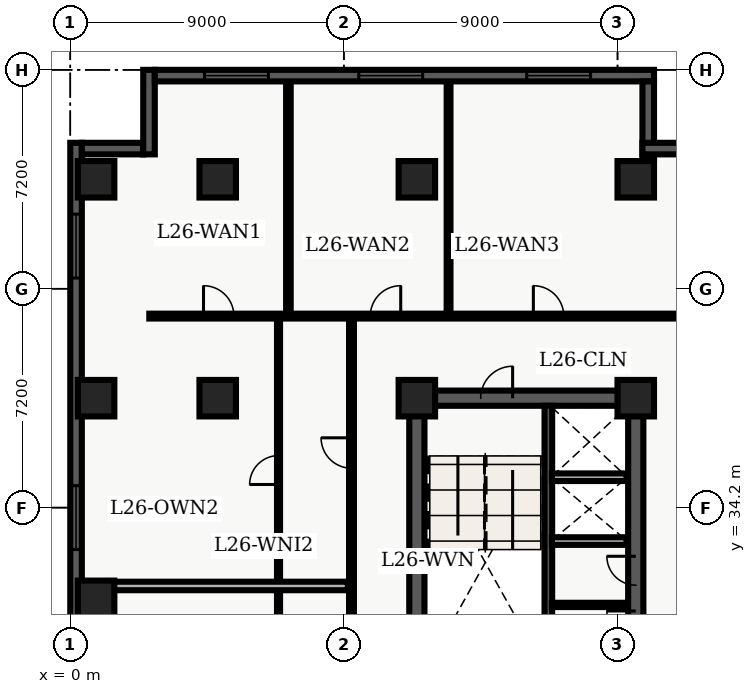
"""IFC4 building model, lengths in metres.
Left out: names, types, materials, properties, quantities, classifications, styles, units other than length and angle.
Written with IfcOpenShell. Run it as: python <this file> out.ifc"""

import sys

from ifc_helpers import new_model, entity, si_unit, converted_unit, direction, frame, origin_with_axes, origin_2d_with_axis, place, context, subcontext, project, spatial, polyline, rectangle, outline, extrude, element, fill, save


model = new_model("IFC4")
c1 = context("Model", 3, precision=1e-05, world=origin_with_axes(), true_north=direction((0.0, 1.0)))
c2 = subcontext(c1, "Body", "Model", "MODEL_VIEW")
j1 = project(units=[si_unit("LENGTHUNIT", "METRE"), converted_unit("PLANEANGLEUNIT", "DEGREE", entity("IfcPlaneAngleMeasure", 0.017), si_unit("PLANEANGLEUNIT", "RADIAN"), dimensions=[0, 0, 0, 0, 0, 0, 0])], contexts=[c1])
p1 = place(None, origin_with_axes())
s1 = spatial("IfcSite", under=j1, at=p1, CompositionType="ELEMENT")
p2 = place(p1, origin_with_axes())
s2 = spatial("IfcBuilding", under=s1, at=p2, CompositionType="ELEMENT")
p3 = place(p2, frame((0.0, 0.0, 108.6), z_axis=(0.0, 0.0, 1.0), x_axis=(1.0, 0.0, 0.0)))
s3 = spatial("IfcBuildingStorey", under=s2, at=p3, CompositionType="ELEMENT", Elevation=108.6)
p4 = place(p3, frame((11.4, 10.8, 0.0), z_axis=(0.0, 0.0, 1.0), x_axis=(0.0, 1.0, 0.0)))
e1 = element("IfcWall", 1, at=p4, inside=s3, PredefinedType="SHEAR", context=c2, shape_type="SweptSolid", body=[
    extrude(outline(polyline([(0.0, -0.25), (27.0, -0.25), (27.0, 0.25), (0.0, 0.25), (0.0, -0.25)])), origin_with_axes(), (0.0, 0.0, 1.0), 3.66),
])
p5 = place(p3, frame((11.4, 37.8, 0.0), z_axis=(0.0, 0.0, 1.0), x_axis=(1.0, 0.0, 0.0)))
e2 = element("IfcWall", 2, at=p5, inside=s3, PredefinedType="SHEAR", context=c2, shape_type="SweptSolid", body=[
    extrude(outline(polyline([(0.0, -0.25), (7.2, -0.25), (7.2, 0.25), (0.0, 0.25), (0.0, -0.25)])), origin_with_axes(), (0.0, 0.0, 1.0), 3.66),
])
p6 = place(p5, frame((2.625, 0.0, 0.0), z_axis=(0.0, 0.0, 1.0), x_axis=(1.0, 0.0, 0.0)))
e3 = element("IfcOpeningElement", 3, at=p6, cuts=e2, PredefinedType="OPENING", context=c2, shape_type="SweptSolid", body=[
    extrude(rectangle(XDim=1.05, YDim=0.52, at=origin_2d_with_axis()), origin_with_axes(), (0.0, 0.0, 1.0), 2.15),
])
p7 = place(p3, frame((18.6, 24.3, 0.0), z_axis=(0.0, 0.0, 1.0), x_axis=(0.0, 1.0, 0.0)))
e4 = element("IfcWall", 4, at=p7, inside=s3, PredefinedType="SHEAR", context=c2, shape_type="SweptSolid", body=[
    extrude(outline(polyline([(0.0, -0.25), (13.5, -0.25), (13.5, 0.25), (0.0, 0.25), (0.0, -0.25)])), origin_with_axes(), (0.0, 0.0, 1.0), 3.66),
])
p8 = place(p7, frame((6.025, 0.0, 0.0), z_axis=(0.0, 0.0, 1.0), x_axis=(1.0, 0.0, 0.0)))
e5 = element("IfcOpeningElement", 5, at=p8, cuts=e4, PredefinedType="OPENING", context=c2, shape_type="SweptSolid", body=[
    extrude(rectangle(XDim=0.95, YDim=0.52, at=origin_2d_with_axis()), origin_with_axes(), (0.0, 0.0, 1.0), 2.15),
])
p9 = place(p7, frame((7.825, 0.0, 0.0), z_axis=(0.0, 0.0, 1.0), x_axis=(1.0, 0.0, 0.0)))
e6 = element("IfcOpeningElement", 6, at=p9, cuts=e4, PredefinedType="OPENING", context=c2, shape_type="SweptSolid", body=[
    extrude(rectangle(XDim=0.95, YDim=0.52, at=origin_2d_with_axis()), origin_with_axes(), (0.0, 0.0, 1.0), 2.15),
])
p10 = place(p3, frame((15.725, 28.9, 0.0), z_axis=(0.0, 0.0, 1.0), x_axis=(0.0, 1.0, 0.0)))
e7 = element("IfcWall", 7, at=p10, inside=s3, PredefinedType="SHEAR", context=c2, shape_type="SweptSolid", body=[
    extrude(outline(polyline([(0.0, -0.125), (8.65, -0.125), (8.65, 0.125), (0.0, 0.125), (0.0, -0.125)])), origin_with_axes(), (0.0, 0.0, 1.0), 3.66),
])
for number, where, z_axis, x_axis in (
    (8, (11.4, 37.8, 0.0), (0.0, 0.0, 1.0), (1.0, 0.0, 0.0)),
    (9, (11.4, 45.0, 0.0), (0.0, 0.0, 1.0), (1.0, 0.0, 0.0)),
    (10, (18.6, 37.8, 0.0), (0.0, 0.0, 1.0), (1.0, 0.0, 0.0)),
    (11, (18.6, 45.0, 0.0), (0.0, 0.0, 1.0), (1.0, 0.0, 0.0)),
    (12, (4.85, 37.8, 0.0), (0.0, 0.0, 1.0), (1.0, 0.0, 0.0)),
    (13, (4.85, 45.0, 0.0), (0.0, 0.0, 1.0), (1.0, 0.0, 0.0)),
    (14, (0.85, 31.2, 0.0), (0.0, 0.0, 1.0), (1.0, 0.0, 0.0)),
    (15, (0.85, 37.8, 0.0), (0.0, 0.0, 1.0), (1.0, 0.0, 0.0)),
    (16, (0.85, 45.0, 0.0), (0.0, 0.0, 1.0), (1.0, 0.0, 0.0)),
):
    element("IfcColumn", number, at=place(p3, frame(where, z_axis=z_axis, x_axis=x_axis)), inside=s3, PredefinedType="COLUMN", context=c2, shape_type="SweptSolid", body=[
        extrude(rectangle(XDim=1.2, YDim=1.2, at=origin_2d_with_axis()), origin_with_axes(), (0.0, 0.0, 1.0), 3.9),
    ])
for number, where, z_axis, x_axis in (
    (17, (15.84, 33.1, 0.0), (0.0, 0.0, 1.0), (1.0, 0.0, 0.0)),
    (18, (15.84, 35.2, 0.0), (0.0, 0.0, 1.0), (1.0, 0.0, 0.0)),
):
    element("IfcWall", number, at=place(p3, frame(where, z_axis=z_axis, x_axis=x_axis)), inside=s3, PredefinedType="SOLIDWALL", context=c2, shape_type="SweptSolid", body=[
        extrude(outline(polyline([(0.0, -0.125), (2.46, -0.125), (2.46, 0.125), (0.0, 0.125), (0.0, -0.125)])), origin_with_axes(), (0.0, 0.0, 1.0), 2.7),
    ])
p11 = place(p3, frame((15.84, 31.0, 0.0), z_axis=(0.0, 0.0, 1.0), x_axis=(1.0, 0.0, 0.0)))
e19 = element("IfcWall", 19, at=p11, inside=s3, PredefinedType="PARTITIONING", context=c2, shape_type="SweptSolid", body=[
    extrude(outline(polyline([(0.0, -0.07), (2.46, -0.07), (2.46, 0.07), (0.0, 0.07), (0.0, -0.07)])), origin_with_axes(), (0.0, 0.0, 1.0), 2.7),
])
p12 = place(p3, frame((2.6, 40.5, 0.0), z_axis=(0.0, 0.0, 1.0), x_axis=(1.0, 0.0, 0.0)))
e20 = element("IfcWall", 20, at=p12, inside=s3, PredefinedType="PARTITIONING", context=c2, shape_type="SweptSolid", body=[
    extrude(outline(polyline([(0.0, -0.08), (18.65, -0.08), (18.65, 0.08), (0.0, 0.08), (0.0, -0.08)])), origin_with_axes(), (0.0, 0.0, 1.0), 2.7),
])
p13 = place(p12, frame((2.283, 0.0, 0.0), z_axis=(0.0, 0.0, 1.0), x_axis=(1.0, 0.0, 0.0)))
e21 = element("IfcOpeningElement", 21, at=p13, cuts=e20, PredefinedType="OPENING", context=c2, shape_type="SweptSolid", body=[
    extrude(rectangle(XDim=1.0, YDim=0.18, at=origin_2d_with_axis()), origin_with_axes(), (0.0, 0.0, 1.0), 2.15),
])
p14 = place(p12, frame((7.769, 0.0, 0.0), z_axis=(0.0, 0.0, 1.0), x_axis=(1.0, 0.0, 0.0)))
e22 = element("IfcOpeningElement", 22, at=p14, cuts=e20, PredefinedType="OPENING", context=c2, shape_type="SweptSolid", body=[
    extrude(rectangle(XDim=1.0, YDim=0.18, at=origin_2d_with_axis()), origin_with_axes(), (0.0, 0.0, 1.0), 2.15),
])
p15 = place(p12, frame((13.132, 0.0, 0.0), z_axis=(0.0, 0.0, 1.0), x_axis=(1.0, 0.0, 0.0)))
e23 = element("IfcOpeningElement", 23, at=p15, cuts=e20, PredefinedType="OPENING", context=c2, shape_type="SweptSolid", body=[
    extrude(rectangle(XDim=1.0, YDim=0.18, at=origin_2d_with_axis()), origin_with_axes(), (0.0, 0.0, 1.0), 2.15),
])
p16 = place(p3, frame((9.25, 24.4, 0.0), z_axis=(0.0, 0.0, 1.0), x_axis=(0.0, 1.0, 0.0)))
e24 = element("IfcWall", 24, at=p16, inside=s3, PredefinedType="PARTITIONING", context=c2, shape_type="SweptSolid", body=[
    extrude(outline(polyline([(0.0, -0.08), (16.1, -0.08), (16.1, 0.08), (0.0, 0.08), (0.0, -0.08)])), origin_with_axes(), (0.0, 0.0, 1.0), 2.7),
])
p17 = place(p16, frame((3.651, 0.0, 0.0), z_axis=(0.0, 0.0, 1.0), x_axis=(1.0, 0.0, 0.0)))
e25 = element("IfcOpeningElement", 25, at=p17, cuts=e24, PredefinedType="OPENING", context=c2, shape_type="SweptSolid", body=[
    extrude(rectangle(XDim=1.0, YDim=0.18, at=origin_2d_with_axis()), origin_with_axes(), (0.0, 0.0, 1.0), 2.15),
])
p18 = place(p16, frame((11.597, 0.0, 0.0), z_axis=(0.0, 0.0, 1.0), x_axis=(1.0, 0.0, 0.0)))
e26 = element("IfcOpeningElement", 26, at=p18, cuts=e24, PredefinedType="OPENING", context=c2, shape_type="SweptSolid", body=[
    extrude(rectangle(XDim=1.0, YDim=0.18, at=origin_2d_with_axis()), origin_with_axes(), (0.0, 0.0, 1.0), 2.15),
])
p19 = place(p3, frame((6.85, 24.55, 0.0), z_axis=(0.0, 0.0, 1.0), x_axis=(0.0, 1.0, 0.0)))
e27 = element("IfcWall", 27, at=p19, inside=s3, PredefinedType="PARTITIONING", context=c2, shape_type="SweptSolid", body=[
    extrude(outline(polyline([(0.0, -0.05), (15.75, -0.05), (15.75, 0.05), (0.0, 0.05), (0.0, -0.05)])), origin_with_axes(), (0.0, 0.0, 1.0), 2.7),
])
p20 = place(p19, frame((3.502, 0.0, 0.0), z_axis=(0.0, 0.0, 1.0), x_axis=(1.0, 0.0, 0.0)))
e28 = element("IfcOpeningElement", 28, at=p20, cuts=e27, PredefinedType="OPENING", context=c2, shape_type="SweptSolid", body=[
    extrude(rectangle(XDim=0.95, YDim=0.12, at=origin_2d_with_axis()), origin_with_axes(), (0.0, 0.0, 1.0), 2.15),
])
p21 = place(p19, frame((10.886, 0.0, 0.0), z_axis=(0.0, 0.0, 1.0), x_axis=(1.0, 0.0, 0.0)))
e29 = element("IfcOpeningElement", 29, at=p21, cuts=e27, PredefinedType="OPENING", context=c2, shape_type="SweptSolid", body=[
    extrude(rectangle(XDim=0.95, YDim=0.12, at=origin_2d_with_axis()), origin_with_axes(), (0.0, 0.0, 1.0), 2.15),
])
p22 = place(p3, frame((0.375, 31.623, 0.0), z_axis=(0.0, 0.0, 1.0), x_axis=(1.0, 0.0, 0.0)))
e30 = element("IfcWall", 30, at=p22, inside=s3, PredefinedType="PARTITIONING", context=c2, shape_type="SweptSolid", body=[
    extrude(outline(polyline([(0.0, -0.14), (8.755, -0.14), (8.755, 0.14), (0.0, 0.14), (0.0, -0.14)])), origin_with_axes(), (0.0, 0.0, 1.0), 2.7),
])
p23 = place(p3, frame((7.175, 40.6, 0.0), z_axis=(0.0, 0.0, 1.0), x_axis=(0.0, 1.0, 0.0)))
e31 = element("IfcWall", 31, at=p23, inside=s3, PredefinedType="PARTITIONING", context=c2, shape_type="SweptSolid", body=[
    extrude(outline(polyline([(0.0, -0.075), (7.64, -0.075), (7.64, 0.075), (0.0, 0.075), (0.0, -0.075)])), origin_with_axes(), (0.0, 0.0, 1.0), 2.7),
])
p24 = place(p3, frame((12.443, 40.6, 0.0), z_axis=(0.0, 0.0, 1.0), x_axis=(0.0, 1.0, 0.0)))
e32 = element("IfcWall", 32, at=p24, inside=s3, PredefinedType="PARTITIONING", context=c2, shape_type="SweptSolid", body=[
    extrude(outline(polyline([(0.0, -0.062), (7.64, -0.062), (7.64, 0.062), (0.0, 0.062), (0.0, -0.062)])), origin_with_axes(), (0.0, 0.0, 1.0), 2.7),
])
p25 = place(p3, frame((0.19, 2.78, 0.0), z_axis=(0.0, 0.0, 1.0), x_axis=(0.0, 1.0, 0.0)))
e33 = element("IfcWall", 33, at=p25, inside=s3, PredefinedType="SOLIDWALL", context=c2, shape_type="SweptSolid", body=[
    extrude(outline(polyline([(0.0, -0.19), (43.42, -0.19), (43.42, 0.19), (0.0, 0.19), (0.0, -0.19)])), origin_with_axes(), (0.0, 0.0, 1.0), 3.66),
])
p26 = place(p25, frame((2.946, 0.0, 0.45), z_axis=(0.0, 0.0, 1.0), x_axis=(1.0, 0.0, 0.0)))
e34 = element("IfcOpeningElement", 34, at=p26, cuts=e33, PredefinedType="OPENING", context=c2, shape_type="SweptSolid", body=[
    extrude(rectangle(XDim=2.1, YDim=0.4, at=origin_2d_with_axis()), origin_with_axes(), (0.0, 0.0, 1.0), 2.2),
])
p27 = place(p25, frame((12.328, 0.0, 0.45), z_axis=(0.0, 0.0, 1.0), x_axis=(1.0, 0.0, 0.0)))
e35 = element("IfcOpeningElement", 35, at=p27, cuts=e33, PredefinedType="OPENING", context=c2, shape_type="SweptSolid", body=[
    extrude(rectangle(XDim=2.1, YDim=0.4, at=origin_2d_with_axis()), origin_with_axes(), (0.0, 0.0, 1.0), 2.2),
])
p28 = place(p25, frame((26.401, 0.0, 0.45), z_axis=(0.0, 0.0, 1.0), x_axis=(1.0, 0.0, 0.0)))
e36 = element("IfcOpeningElement", 36, at=p28, cuts=e33, PredefinedType="OPENING", context=c2, shape_type="SweptSolid", body=[
    extrude(rectangle(XDim=2.1, YDim=0.4, at=origin_2d_with_axis()), origin_with_axes(), (0.0, 0.0, 1.0), 2.2),
])
p29 = place(p25, frame((31.092, 0.0, 0.45), z_axis=(0.0, 0.0, 1.0), x_axis=(1.0, 0.0, 0.0)))
e37 = element("IfcOpeningElement", 37, at=p29, cuts=e33, PredefinedType="OPENING", context=c2, shape_type="SweptSolid", body=[
    extrude(rectangle(XDim=2.1, YDim=0.4, at=origin_2d_with_axis()), origin_with_axes(), (0.0, 0.0, 1.0), 2.2),
])
p30 = place(p25, frame((40.024, 0.0, 0.45), z_axis=(0.0, 0.0, 1.0), x_axis=(1.0, 0.0, 0.0)))
e38 = element("IfcOpeningElement", 38, at=p30, cuts=e33, PredefinedType="OPENING", context=c2, shape_type="SweptSolid", body=[
    extrude(rectangle(XDim=2.1, YDim=0.4, at=origin_2d_with_axis()), origin_with_axes(), (0.0, 0.0, 1.0), 2.2),
])
p31 = place(p3, frame((0.38, 46.01, 0.0), z_axis=(0.0, 0.0, 1.0), x_axis=(1.0, 0.0, 0.0)))
e39 = element("IfcWall", 39, at=p31, inside=s3, PredefinedType="SOLIDWALL", context=c2, shape_type="SweptSolid", body=[
    extrude(outline(polyline([(0.0, -0.19), (2.02, -0.19), (2.02, 0.19), (0.0, 0.19), (0.0, -0.19)])), origin_with_axes(), (0.0, 0.0, 1.0), 3.66),
])
p32 = place(p3, frame((2.59, 45.82, 0.0), z_axis=(0.0, 0.0, 1.0), x_axis=(0.0, 1.0, 0.0)))
e40 = element("IfcWall", 40, at=p32, inside=s3, PredefinedType="SOLIDWALL", context=c2, shape_type="SweptSolid", body=[
    extrude(outline(polyline([(0.0, -0.19), (2.78, -0.19), (2.78, 0.19), (0.0, 0.19), (0.0, -0.19)])), origin_with_axes(), (0.0, 0.0, 1.0), 3.66),
])
p33 = place(p3, frame((2.78, 48.41, 0.0), z_axis=(0.0, 0.0, 1.0), x_axis=(1.0, 0.0, 0.0)))
e41 = element("IfcWall", 41, at=p33, inside=s3, PredefinedType="SOLIDWALL", context=c2, shape_type="SweptSolid", body=[
    extrude(outline(polyline([(0.0, -0.19), (16.42, -0.19), (16.42, 0.19), (0.0, 0.19), (0.0, -0.19)])), origin_with_axes(), (0.0, 0.0, 1.0), 3.66),
])
p34 = place(p33, frame((2.687, 0.0, 0.45), z_axis=(0.0, 0.0, 1.0), x_axis=(1.0, 0.0, 0.0)))
e42 = element("IfcOpeningElement", 42, at=p34, cuts=e41, PredefinedType="OPENING", context=c2, shape_type="SweptSolid", body=[
    extrude(rectangle(XDim=2.1, YDim=0.4, at=origin_2d_with_axis()), origin_with_axes(), (0.0, 0.0, 1.0), 2.2),
])
p35 = place(p33, frame((7.76, 0.0, 0.45), z_axis=(0.0, 0.0, 1.0), x_axis=(1.0, 0.0, 0.0)))
e43 = element("IfcOpeningElement", 43, at=p35, cuts=e41, PredefinedType="OPENING", context=c2, shape_type="SweptSolid", body=[
    extrude(rectangle(XDim=2.1, YDim=0.4, at=origin_2d_with_axis()), origin_with_axes(), (0.0, 0.0, 1.0), 2.2),
])
p36 = place(p33, frame((13.283, 0.0, 0.45), z_axis=(0.0, 0.0, 1.0), x_axis=(1.0, 0.0, 0.0)))
e44 = element("IfcOpeningElement", 44, at=p36, cuts=e41, PredefinedType="OPENING", context=c2, shape_type="SweptSolid", body=[
    extrude(rectangle(XDim=2.1, YDim=0.4, at=origin_2d_with_axis()), origin_with_axes(), (0.0, 0.0, 1.0), 2.2),
])
p37 = place(p3, frame((19.01, 48.22, 0.0), z_axis=(0.0, 0.0, 1.0), x_axis=(0.0, -1.0, 0.0)))
e45 = element("IfcWall", 45, at=p37, inside=s3, PredefinedType="SOLIDWALL", context=c2, shape_type="SweptSolid", body=[
    extrude(outline(polyline([(0.0, -0.19), (2.56, -0.19), (2.56, 0.19), (0.0, 0.19), (0.0, -0.19)])), origin_with_axes(), (0.0, 0.0, 1.0), 3.66),
])
p38 = place(p3, frame((18.82, 46.01, 0.0), z_axis=(0.0, 0.0, 1.0), x_axis=(1.0, 0.0, 0.0)))
e46 = element("IfcWall", 46, at=p38, inside=s3, PredefinedType="SOLIDWALL", context=c2, shape_type="SweptSolid", body=[
    extrude(outline(polyline([(0.0, -0.19), (2.78, -0.19), (2.78, 0.19), (0.0, 0.19), (0.0, -0.19)])), origin_with_axes(), (0.0, 0.0, 1.0), 3.66),
])
p39 = place(p5, frame((2.625, 0.0, 0.0), z_axis=(0.0, 0.0, 1.0), x_axis=(1.0, 0.0, 0.0)))
e47 = element("IfcDoor", 47, at=p39, inside=s3, OperationType="SINGLE_SWING_RIGHT", PredefinedType="DOOR", context=c2, shape_type="SweptSolid", body=[
    extrude(rectangle(XDim=1.05, YDim=0.09, at=origin_2d_with_axis()), origin_with_axes(), (0.0, 0.0, 1.0), 2.15),
])
fill(e3, e47)
p40 = place(p7, frame((6.025, 0.0, 0.0), z_axis=(0.0, 0.0, 1.0), x_axis=(1.0, 0.0, 0.0)))
e48 = element("IfcDoor", 48, at=p40, inside=s3, OperationType="SINGLE_SWING_RIGHT", PredefinedType="DOOR", context=c2, shape_type="SweptSolid", body=[
    extrude(rectangle(XDim=0.95, YDim=0.09, at=origin_2d_with_axis()), origin_with_axes(), (0.0, 0.0, 1.0), 2.15),
])
fill(e5, e48)
p41 = place(p7, frame((7.825, 0.0, 0.0), z_axis=(0.0, 0.0, 1.0), x_axis=(1.0, 0.0, 0.0)))
e49 = element("IfcDoor", 49, at=p41, inside=s3, OperationType="SINGLE_SWING_RIGHT", PredefinedType="DOOR", context=c2, shape_type="SweptSolid", body=[
    extrude(rectangle(XDim=0.95, YDim=0.09, at=origin_2d_with_axis()), origin_with_axes(), (0.0, 0.0, 1.0), 2.15),
])
fill(e6, e49)
p42 = place(p19, frame((10.886, 0.0, 0.0), z_axis=(0.0, 0.0, 1.0), x_axis=(1.0, 0.0, 0.0)))
e50 = element("IfcDoor", 50, at=p42, inside=s3, OperationType="SINGLE_SWING_LEFT", PredefinedType="DOOR", context=c2, shape_type="SweptSolid", body=[
    extrude(rectangle(XDim=0.95, YDim=0.06, at=origin_2d_with_axis()), origin_with_axes(), (0.0, 0.0, 1.0), 2.15),
])
fill(e29, e50)
p43 = place(p16, frame((11.597, 0.0, 0.0), z_axis=(0.0, 0.0, 1.0), x_axis=(1.0, 0.0, 0.0)))
e51 = element("IfcDoor", 51, at=p43, inside=s3, OperationType="SINGLE_SWING_RIGHT", PredefinedType="DOOR", context=c2, shape_type="SweptSolid", body=[
    extrude(rectangle(XDim=1.0, YDim=0.09, at=origin_2d_with_axis()), origin_with_axes(), (0.0, 0.0, 1.0), 2.15),
])
fill(e26, e51)
p44 = place(p12, frame((2.283, 0.0, 0.0), z_axis=(0.0, 0.0, 1.0), x_axis=(1.0, 0.0, 0.0)))
e52 = element("IfcDoor", 52, at=p44, inside=s3, OperationType="SINGLE_SWING_LEFT", PredefinedType="DOOR", context=c2, shape_type="SweptSolid", body=[
    extrude(rectangle(XDim=1.0, YDim=0.09, at=origin_2d_with_axis()), origin_with_axes(), (0.0, 0.0, 1.0), 2.15),
])
fill(e21, e52)
p45 = place(p12, frame((7.769, 0.0, 0.0), z_axis=(0.0, 0.0, 1.0), x_axis=(1.0, 0.0, 0.0)))
e53 = element("IfcDoor", 53, at=p45, inside=s3, OperationType="SINGLE_SWING_RIGHT", PredefinedType="DOOR", context=c2, shape_type="SweptSolid", body=[
    extrude(rectangle(XDim=1.0, YDim=0.09, at=origin_2d_with_axis()), origin_with_axes(), (0.0, 0.0, 1.0), 2.15),
])
fill(e22, e53)
p46 = place(p12, frame((13.132, 0.0, 0.0), z_axis=(0.0, 0.0, 1.0), x_axis=(1.0, 0.0, 0.0)))
e54 = element("IfcDoor", 54, at=p46, inside=s3, OperationType="SINGLE_SWING_LEFT", PredefinedType="DOOR", context=c2, shape_type="SweptSolid", body=[
    extrude(rectangle(XDim=1.0, YDim=0.09, at=origin_2d_with_axis()), origin_with_axes(), (0.0, 0.0, 1.0), 2.15),
])
fill(e23, e54)
p47 = place(p25, frame((31.092, 0.0, 0.45), z_axis=(0.0, 0.0, 1.0), x_axis=(1.0, 0.0, 0.0)))
e55 = element("IfcWindow", 55, at=p47, inside=s3, PredefinedType="WINDOW", context=c2, shape_type="SweptSolid", body=[
    extrude(rectangle(XDim=2.1, YDim=0.09, at=origin_2d_with_axis()), origin_with_axes(), (0.0, 0.0, 1.0), 2.2),
])
fill(e37, e55)
p48 = place(p25, frame((40.024, 0.0, 0.45), z_axis=(0.0, 0.0, 1.0), x_axis=(1.0, 0.0, 0.0)))
e56 = element("IfcWindow", 56, at=p48, inside=s3, PredefinedType="WINDOW", context=c2, shape_type="SweptSolid", body=[
    extrude(rectangle(XDim=2.1, YDim=0.09, at=origin_2d_with_axis()), origin_with_axes(), (0.0, 0.0, 1.0), 2.2),
])
fill(e38, e56)
p49 = place(p33, frame((2.687, 0.0, 0.45), z_axis=(0.0, 0.0, 1.0), x_axis=(1.0, 0.0, 0.0)))
e57 = element("IfcWindow", 57, at=p49, inside=s3, PredefinedType="WINDOW", context=c2, shape_type="SweptSolid", body=[
    extrude(rectangle(XDim=2.1, YDim=0.09, at=origin_2d_with_axis()), origin_with_axes(), (0.0, 0.0, 1.0), 2.2),
])
fill(e42, e57)
p50 = place(p33, frame((7.76, 0.0, 0.45), z_axis=(0.0, 0.0, 1.0), x_axis=(1.0, 0.0, 0.0)))
e58 = element("IfcWindow", 58, at=p50, inside=s3, PredefinedType="WINDOW", context=c2, shape_type="SweptSolid", body=[
    extrude(rectangle(XDim=2.1, YDim=0.09, at=origin_2d_with_axis()), origin_with_axes(), (0.0, 0.0, 1.0), 2.2),
])
fill(e43, e58)
p51 = place(p33, frame((13.283, 0.0, 0.45), z_axis=(0.0, 0.0, 1.0), x_axis=(1.0, 0.0, 0.0)))
e59 = element("IfcWindow", 59, at=p51, inside=s3, PredefinedType="WINDOW", context=c2, shape_type="SweptSolid", body=[
    extrude(rectangle(XDim=2.1, YDim=0.09, at=origin_2d_with_axis()), origin_with_axes(), (0.0, 0.0, 1.0), 2.2),
])
fill(e44, e59)
save(model, sys.argv[1])
